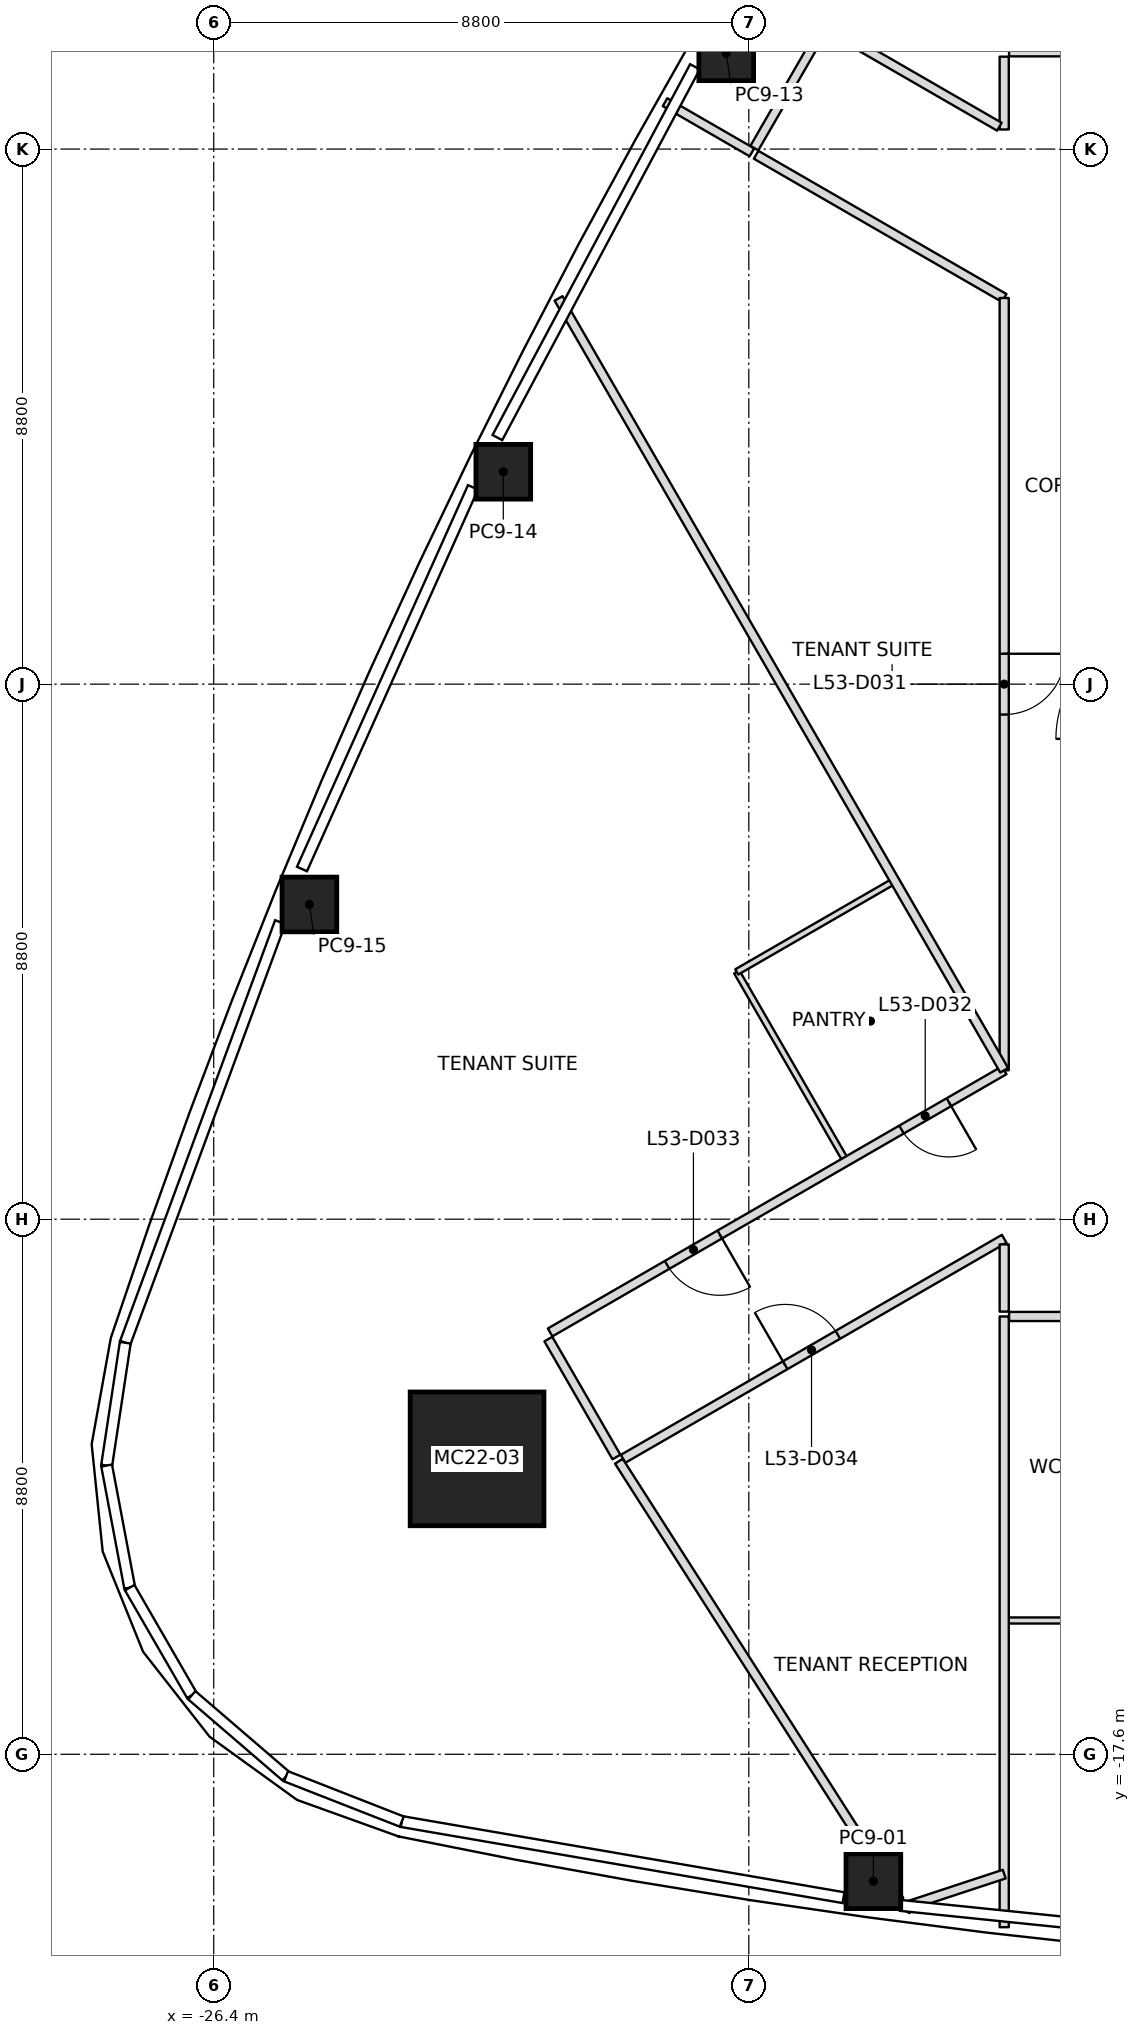
"""IFC4 building model, lengths in metres.
Left out: names, types, materials, properties, quantities, classifications, styles, units other than length and angle.
Written with IfcOpenShell. Run it as: python <this file> out.ifc"""

import sys

from ifc_helpers import new_model, si_unit, direction, frame, frame_2d, origin, origin_2d, place, context, subcontext, project, spatial, rectangle, extrude, element, fill, save


model = new_model("IFC4")
c1 = context("Model", 3, precision=1e-05, world=origin(), true_north=direction((0.0, 1.0)))
c2 = subcontext(c1, "Body", "Model", "MODEL_VIEW")
j1 = project(units=[si_unit("LENGTHUNIT", "METRE"), si_unit("PLANEANGLEUNIT", "RADIAN")], contexts=[c1])
p1 = place(None, origin())
s1 = spatial("IfcSite", under=j1, at=p1, CompositionType="ELEMENT")
p2 = place(p1, origin())
s2 = spatial("IfcBuilding", under=s1, at=p2, CompositionType="ELEMENT")
p3 = place(p2, frame((0.0, 0.0, 239.0)))
s3 = spatial("IfcBuildingStorey", under=s2, at=p3, CompositionType="ELEMENT", Elevation=239.0)
p4 = place(p3, frame((-22.069, -12.742, 0.0), z_axis=(0.027878605886, 0.016104927689, 0.999481572936), x_axis=(0.999611316129, -0.000449157512, -0.02787498742)))
e1 = element("IfcColumn", 1, at=p4, inside=s3, PredefinedType="COLUMN", context=c2, shape_type="SweptSolid", body=[
    extrude(rectangle(XDim=2.2, YDim=2.2, at=origin_2d()), origin(), (0.0, 0.0, 1.0), 4.002),
])
p5 = place(p3, frame((-15.552, -19.689, 0.0), z_axis=(0.017574453011, 0.010434831475, 0.999791104628), x_axis=(-0.990548112361, 0.136230512551, 0.015990139082)))
e2 = element("IfcColumn", 2, at=p5, inside=s3, PredefinedType="COLUMN", context=c2, shape_type="SweptSolid", body=[
    extrude(rectangle(XDim=0.9, YDim=0.9, at=origin_2d()), origin(), (0.0, 0.0, 1.0), 4.001),
])
p6 = place(p3, frame((-17.971, 10.376, 0.0), z_axis=(0.009887049298, -0.00573692984, 0.999934664812), x_axis=(0.499975560967, 0.866039512843, 2.5126546e-05)))
e3 = element("IfcColumn", 3, at=p6, inside=s3, PredefinedType="COLUMN", context=c2, shape_type="SweptSolid", body=[
    extrude(rectangle(XDim=0.9, YDim=0.9, at=origin_2d()), origin(), (0.0, 0.0, 1.0), 4.0),
])
p7 = place(p3, frame((-21.638, 3.493, 0.0), z_axis=(0.014036672696, 0.002074986399, 0.999899328058), x_axis=(0.43974223554, 0.898088066598, -0.008036847439)))
e4 = element("IfcColumn", 4, at=p7, inside=s3, PredefinedType="COLUMN", context=c2, shape_type="SweptSolid", body=[
    extrude(rectangle(XDim=0.9, YDim=0.9, at=origin_2d()), origin(), (0.0, 0.0, 1.0), 4.0),
])
p8 = place(p3, frame((-24.826, -3.624, 0.0), z_axis=(0.017757540332, 0.01000768596, 0.999792236409), x_axis=(0.377462895724, 0.925886955213, -0.015972116901)))
e5 = element("IfcColumn", 5, at=p8, inside=s3, PredefinedType="COLUMN", context=c2, shape_type="SweptSolid", body=[
    extrude(rectangle(XDim=0.9, YDim=0.9, at=origin_2d()), origin(), (0.0, 0.0, 1.0), 4.001),
])
p9 = place(p3, frame((-13.4, -6.351, 0.0), z_axis=(0.0, 0.0, 1.0), x_axis=(-0.500006471202, 0.866021667602, 0.0)))
e6 = element("IfcWall", 6, at=p9, inside=s3, PredefinedType="PARTITIONING", context=c2, shape_type="SweptSolid", body=[
    extrude(rectangle(XDim=14.658, YDim=0.15, at=frame_2d((7.329, 0.0))), origin(), (0.0, 0.0, 1.0), 3.234),
])
p10 = place(p3, frame((-19.737, -12.781, 0.0), z_axis=(0.0, 0.0, 1.0), x_axis=(0.538422993962, -0.842674717535, 0.0)))
e7 = element("IfcWall", 7, at=p10, inside=s3, PredefinedType="PARTITIONING", context=c2, shape_type="SweptSolid", body=[
    extrude(rectangle(XDim=8.57, YDim=0.15, at=frame_2d((4.285, 0.0))), origin(), (0.0, 0.0, 1.0), 3.3),
])
p11 = place(p3, frame((-17.549, 8.747, 0.0), z_axis=(0.0, 0.0, 1.0), x_axis=(-0.866067297121, 0.499927431592, 0.0)))
e8 = element("IfcWall", 8, at=p11, inside=s3, PredefinedType="PARTITIONING", context=c2, shape_type="SweptSolid", body=[
    extrude(rectangle(XDim=1.65, YDim=0.15, at=frame_2d((0.825, 0.0))), origin(), (0.0, 0.0, 1.0), 3.234),
])
p12 = place(p3, frame((-13.4, -10.4, 0.0), z_axis=(0.0, 0.0, 1.0), x_axis=(0.0, -1.0, 0.0)))
e9 = element("IfcWall", 9, at=p12, inside=s3, PredefinedType="PARTITIONING", context=c2, shape_type="SweptSolid", body=[
    extrude(rectangle(XDim=10.045, YDim=0.15, at=frame_2d((5.022, 0.0))), origin(), (0.0, 0.0, 1.0), 3.084),
])
p13 = place(p3, frame((-13.4, -19.571, 0.0), z_axis=(0.0, 0.0, 1.0), x_axis=(-0.949797873729, -0.312864186286, 0.0)))
e10 = element("IfcWall", 10, at=p13, inside=s3, PredefinedType="PARTITIONING", context=c2, shape_type="SweptSolid", body=[
    extrude(rectangle(XDim=1.656, YDim=0.15, at=frame_2d((0.828, 0.0))), origin(), (0.0, 0.0, 1.0), 3.084),
])
p14 = place(p3, frame((-15.023, -20.176, 0.0), z_axis=(0.0, 0.0, 1.0), x_axis=(0.492769953399, 0.870159625027, 0.0)))
e11 = element("IfcWall", 11, at=p14, inside=s3, PredefinedType="PARTITIONING", context=c2, shape_type="SweptSolid", body=[
    extrude(rectangle(XDim=0.102, YDim=0.15, at=frame_2d((0.051, 0.0))), origin(), (0.0, 0.0, 1.0), 3.3),
])
p15 = place(p3, frame((-20.897, -10.772, 0.0), z_axis=(0.0, 0.0, 1.0), x_axis=(0.500030632641, -0.866007717299, 0.0)))
e12 = element("IfcWall", 12, at=p15, inside=s3, PredefinedType="PARTITIONING", context=c2, shape_type="SweptSolid", body=[
    extrude(rectangle(XDim=2.24, YDim=0.15, at=frame_2d((1.12, 0.0))), origin(), (0.0, 0.0, 1.0), 3.233),
])
p16 = place(p3, frame((-13.4, -6.351, 0.0), z_axis=(0.0, 0.0, 1.0), x_axis=(-0.866032359495, -0.499987952162, 0.0)))
e13 = element("IfcWall", 13, at=p16, inside=s3, PredefinedType="PARTITIONING", context=c2, shape_type="SweptSolid", body=[
    extrude(rectangle(XDim=8.623, YDim=0.15, at=frame_2d((4.312, 0.0))), origin(), (0.0, 0.0, 1.0), 3.3),
])
p17 = place(p16, frame((1.05, 0.0, 0.0)))
e14 = element("IfcOpeningElement", 14, at=p17, cuts=e13, PredefinedType="OPENING", context=c2, shape_type="SweptSolid", body=[
    extrude(rectangle(XDim=0.9, YDim=2.1, at=frame_2d((0.45, 1.05))), frame((0.0, 0.075, 0.0), z_axis=(0.0, -1.0, 0.0), x_axis=(1.0, 0.0, 0.0)), (0.0, 0.0, 1.0), 0.15),
])
p18 = place(p16, frame((5.402, 0.0, 0.0)))
e15 = element("IfcOpeningElement", 15, at=p18, cuts=e13, PredefinedType="OPENING", context=c2, shape_type="SweptSolid", body=[
    extrude(rectangle(XDim=1.0, YDim=2.1, at=frame_2d((0.5, 1.05))), frame((0.0, 0.075, 0.0), z_axis=(0.0, -1.0, 0.0), x_axis=(1.0, 0.0, 0.0)), (0.0, 0.0, 1.0), 0.15),
])
p19 = place(p3, frame((-19.668, -12.741, 0.0), z_axis=(0.0, 0.0, 1.0), x_axis=(0.866023808947, 0.500002762329, 0.0)))
e16 = element("IfcWall", 16, at=p19, inside=s3, PredefinedType="PARTITIONING", context=c2, shape_type="SweptSolid", body=[
    extrude(rectangle(XDim=7.238, YDim=0.15, at=frame_2d((3.619, 0.0))), origin(), (0.0, 0.0, 1.0), 3.233),
])
p20 = place(p19, frame((3.079, 0.0, 0.0)))
e17 = element("IfcOpeningElement", 17, at=p20, cuts=e16, PredefinedType="OPENING", context=c2, shape_type="SweptSolid", body=[
    extrude(rectangle(XDim=1.0, YDim=2.1, at=frame_2d((0.5, 1.05))), frame((0.0, 0.075, 0.0), z_axis=(0.0, -1.0, 0.0), x_axis=(1.0, 0.0, 0.0)), (0.0, 0.0, 1.0), 0.15),
])
p21 = place(p3, frame((-13.4, -9.214, 0.0), z_axis=(0.0, 0.0, 1.0), x_axis=(0.0, -1.0, 0.0)))
e18 = element("IfcWall", 18, at=p21, inside=s3, PredefinedType="PARTITIONING", context=c2, shape_type="SweptSolid", body=[
    extrude(rectangle(XDim=1.106, YDim=0.15, at=frame_2d((0.553, 0.0))), origin(), (0.0, 0.0, 1.0), 3.233),
])
p22 = place(p3, frame((-16.389, 10.756, 0.0), z_axis=(0.0, 0.0, 1.0), x_axis=(-0.500077830873, -0.865980463445, 0.0)))
e19 = element("IfcWall", 19, at=p22, inside=s3, PredefinedType="PARTITIONING", context=c2, shape_type="SweptSolid", body=[
    extrude(rectangle(XDim=2.24, YDim=0.15, at=frame_2d((1.12, 0.0))), origin(), (0.0, 0.0, 1.0), 3.3),
])
p23 = place(p3, frame((-17.48, 8.707, 0.0), z_axis=(0.0, 0.0, 1.0), x_axis=(0.866018171646, -0.500012526222, 0.0)))
e20 = element("IfcWall", 20, at=p23, inside=s3, PredefinedType="PARTITIONING", context=c2, shape_type="SweptSolid", body=[
    extrude(rectangle(XDim=4.711, YDim=0.15, at=frame_2d((2.356, 0.0))), origin(), (0.0, 0.0, 1.0), 3.3),
])
p24 = place(p3, frame((-13.4, 6.351, 0.0), z_axis=(0.0, 0.0, 1.0), x_axis=(0.0, -1.0, 0.0)))
e21 = element("IfcWall", 21, at=p24, inside=s3, PredefinedType="PARTITIONING", context=c2, shape_type="SweptSolid", body=[
    extrude(rectangle(XDim=12.702, YDim=0.15, at=frame_2d((6.351, 0.0))), origin(), (0.0, 0.0, 1.0), 3.3),
])
p25 = place(p24, frame((5.851, 0.0, 0.0)))
e22 = element("IfcOpeningElement", 22, at=p25, cuts=e21, PredefinedType="OPENING", context=c2, shape_type="SweptSolid", body=[
    extrude(rectangle(XDim=1.0, YDim=2.1, at=frame_2d((0.5, 1.05))), frame((0.0, 0.075, 0.0), z_axis=(0.0, -1.0, 0.0), x_axis=(1.0, 0.0, 0.0)), (0.0, 0.0, 1.0), 0.15),
])
p26 = place(p3, frame((-13.4, 10.32, 0.0), z_axis=(0.0, 0.0, 1.0), x_axis=(0.0, -1.0, 0.0)))
e23 = element("IfcWall", 23, at=p26, inside=s3, PredefinedType="PARTITIONING", context=c2, shape_type="SweptSolid", body=[
    extrude(rectangle(XDim=1.198, YDim=0.15, at=frame_2d((0.599, 0.0))), origin(), (0.0, 0.0, 1.0), 3.3),
])
p27 = place(p3, frame((-13.479, 9.168, 0.0), z_axis=(0.0, 0.0, 1.0), x_axis=(-0.866037246281, 0.499979487633, 0.0)))
e24 = element("IfcWall", 24, at=p27, inside=s3, PredefinedType="PARTITIONING", context=c2, shape_type="SweptSolid", body=[
    extrude(rectangle(XDim=3.234, YDim=0.15, at=frame_2d((1.617, 0.0))), origin(), (0.0, 0.0, 1.0), 3.3),
])
p28 = place(p3, frame((-13.32, -10.4, 0.0), z_axis=(0.0, 0.0, 1.0), x_axis=(1.0, 0.0, 0.0)))
e25 = element("IfcWall", 25, at=p28, inside=s3, PredefinedType="PARTITIONING", context=c2, shape_type="SweptSolid", body=[
    extrude(rectangle(XDim=12.12, YDim=0.15, at=frame_2d((6.06, 0.0))), origin(), (0.0, 0.0, 1.0), 3.167),
])
p29 = place(p28, frame((1.57, 0.0, 0.0)))
e26 = element("IfcOpeningElement", 26, at=p29, cuts=e25, PredefinedType="OPENING", context=c2, shape_type="SweptSolid", body=[
    extrude(rectangle(XDim=0.9, YDim=2.1, at=frame_2d((0.45, 1.05))), frame((0.0, 0.075, 0.0), z_axis=(0.0, -1.0, 0.0), x_axis=(1.0, 0.0, 0.0)), (0.0, 0.0, 1.0), 0.15),
])
p30 = place(p28, frame((7.67, 0.0, 0.0)))
e27 = element("IfcOpeningElement", 27, at=p30, cuts=e25, PredefinedType="OPENING", context=c2, shape_type="SweptSolid", body=[
    extrude(rectangle(XDim=1.0, YDim=2.1, at=frame_2d((0.5, 1.05))), frame((0.0, 0.075, 0.0), z_axis=(0.0, -1.0, 0.0), x_axis=(1.0, 0.0, 0.0)), (0.0, 0.0, 1.0), 0.15),
])
p31 = place(p3, frame((-4.98, 10.4, 0.0), z_axis=(0.0, 0.0, 1.0), x_axis=(-1.0, 0.0, 0.0)))
e28 = element("IfcWall", 28, at=p31, inside=s3, PredefinedType="PARTITIONING", context=c2, shape_type="SweptSolid", body=[
    extrude(rectangle(XDim=8.34, YDim=0.15, at=frame_2d((4.17, 0.0))), origin(), (0.0, 0.0, 1.0), 3.3),
])
p32 = place(p31, frame((3.97, 0.0, 0.0)))
e29 = element("IfcOpeningElement", 29, at=p32, cuts=e28, PredefinedType="OPENING", context=c2, shape_type="SweptSolid", body=[
    extrude(rectangle(XDim=1.0, YDim=2.1, at=frame_2d((0.5, 1.05))), frame((0.0, 0.075, 0.0), z_axis=(0.0, -1.0, 0.0), x_axis=(1.0, 0.0, 0.0)), (0.0, 0.0, 1.0), 0.15),
])
p33 = place(p3, frame((-16.013, -7.825, 0.0), z_axis=(0.0, 0.0, 1.0), x_axis=(-0.499971082179, 0.866042098853, 0.0)))
e30 = element("IfcWall", 30, at=p33, inside=s3, PredefinedType="PARTITIONING", context=c2, shape_type="SweptSolid", body=[
    extrude(rectangle(XDim=3.57, YDim=0.1, at=frame_2d((1.785, 0.0))), origin(), (0.0, 0.0, 1.0), 3.3),
])
p34 = place(p3, frame((-17.798, -4.733, 0.0), z_axis=(0.0, 0.0, 1.0), x_axis=(0.866039111053, 0.499976257563, 0.0)))
e31 = element("IfcWall", 31, at=p34, inside=s3, PredefinedType="PARTITIONING", context=c2, shape_type="SweptSolid", body=[
    extrude(rectangle(XDim=2.97, YDim=0.1, at=frame_2d((1.485, 0.0))), origin(), (0.0, 0.0, 1.0), 3.3),
])
p35 = place(p3, frame((-9.2, -15.4, 0.0), z_axis=(0.0, 0.0, 1.0), x_axis=(-1.0, 0.0, 0.0)))
e32 = element("IfcWall", 32, at=p35, inside=s3, PredefinedType="PARTITIONING", context=c2, shape_type="SweptSolid", body=[
    extrude(rectangle(XDim=4.17, YDim=0.1, at=frame_2d((2.085, 0.0))), origin(), (0.0, 0.0, 1.0), 3.243),
])
p36 = place(p25, origin())
e33 = element("IfcDoor", 33, at=p36, inside=s3, OperationType="SINGLE_SWING_LEFT", PredefinedType="DOOR", context=c2, shape_type="SweptSolid", body=[
    extrude(rectangle(XDim=1.0, YDim=2.1, at=frame_2d((0.5, 1.05))), frame((0.0, 0.025, 0.0), z_axis=(0.0, -1.0, 0.0), x_axis=(1.0, 0.0, 0.0)), (0.0, 0.0, 1.0), 0.05),
])
fill(e22, e33)
p37 = place(p17, origin())
e34 = element("IfcDoor", 34, at=p37, inside=s3, OperationType="SINGLE_SWING_LEFT", PredefinedType="DOOR", context=c2, shape_type="SweptSolid", body=[
    extrude(rectangle(XDim=0.9, YDim=2.1, at=frame_2d((0.45, 1.05))), frame((0.0, 0.025, 0.0), z_axis=(0.0, -1.0, 0.0), x_axis=(1.0, 0.0, 0.0)), (0.0, 0.0, 1.0), 0.05),
])
fill(e14, e34)
p38 = place(p18, origin())
e35 = element("IfcDoor", 35, at=p38, inside=s3, OperationType="SINGLE_SWING_LEFT", PredefinedType="DOOR", context=c2, shape_type="SweptSolid", body=[
    extrude(rectangle(XDim=1.0, YDim=2.1, at=frame_2d((0.5, 1.05))), frame((0.0, 0.025, 0.0), z_axis=(0.0, -1.0, 0.0), x_axis=(1.0, 0.0, 0.0)), (0.0, 0.0, 1.0), 0.05),
])
fill(e15, e35)
p39 = place(p20, origin())
e36 = element("IfcDoor", 36, at=p39, inside=s3, OperationType="SINGLE_SWING_LEFT", PredefinedType="DOOR", context=c2, shape_type="SweptSolid", body=[
    extrude(rectangle(XDim=1.0, YDim=2.1, at=frame_2d((0.5, 1.05))), frame((0.0, 0.025, 0.0), z_axis=(0.0, -1.0, 0.0), x_axis=(1.0, 0.0, 0.0)), (0.0, 0.0, 1.0), 0.05),
])
fill(e17, e36)
save(model, sys.argv[1])
